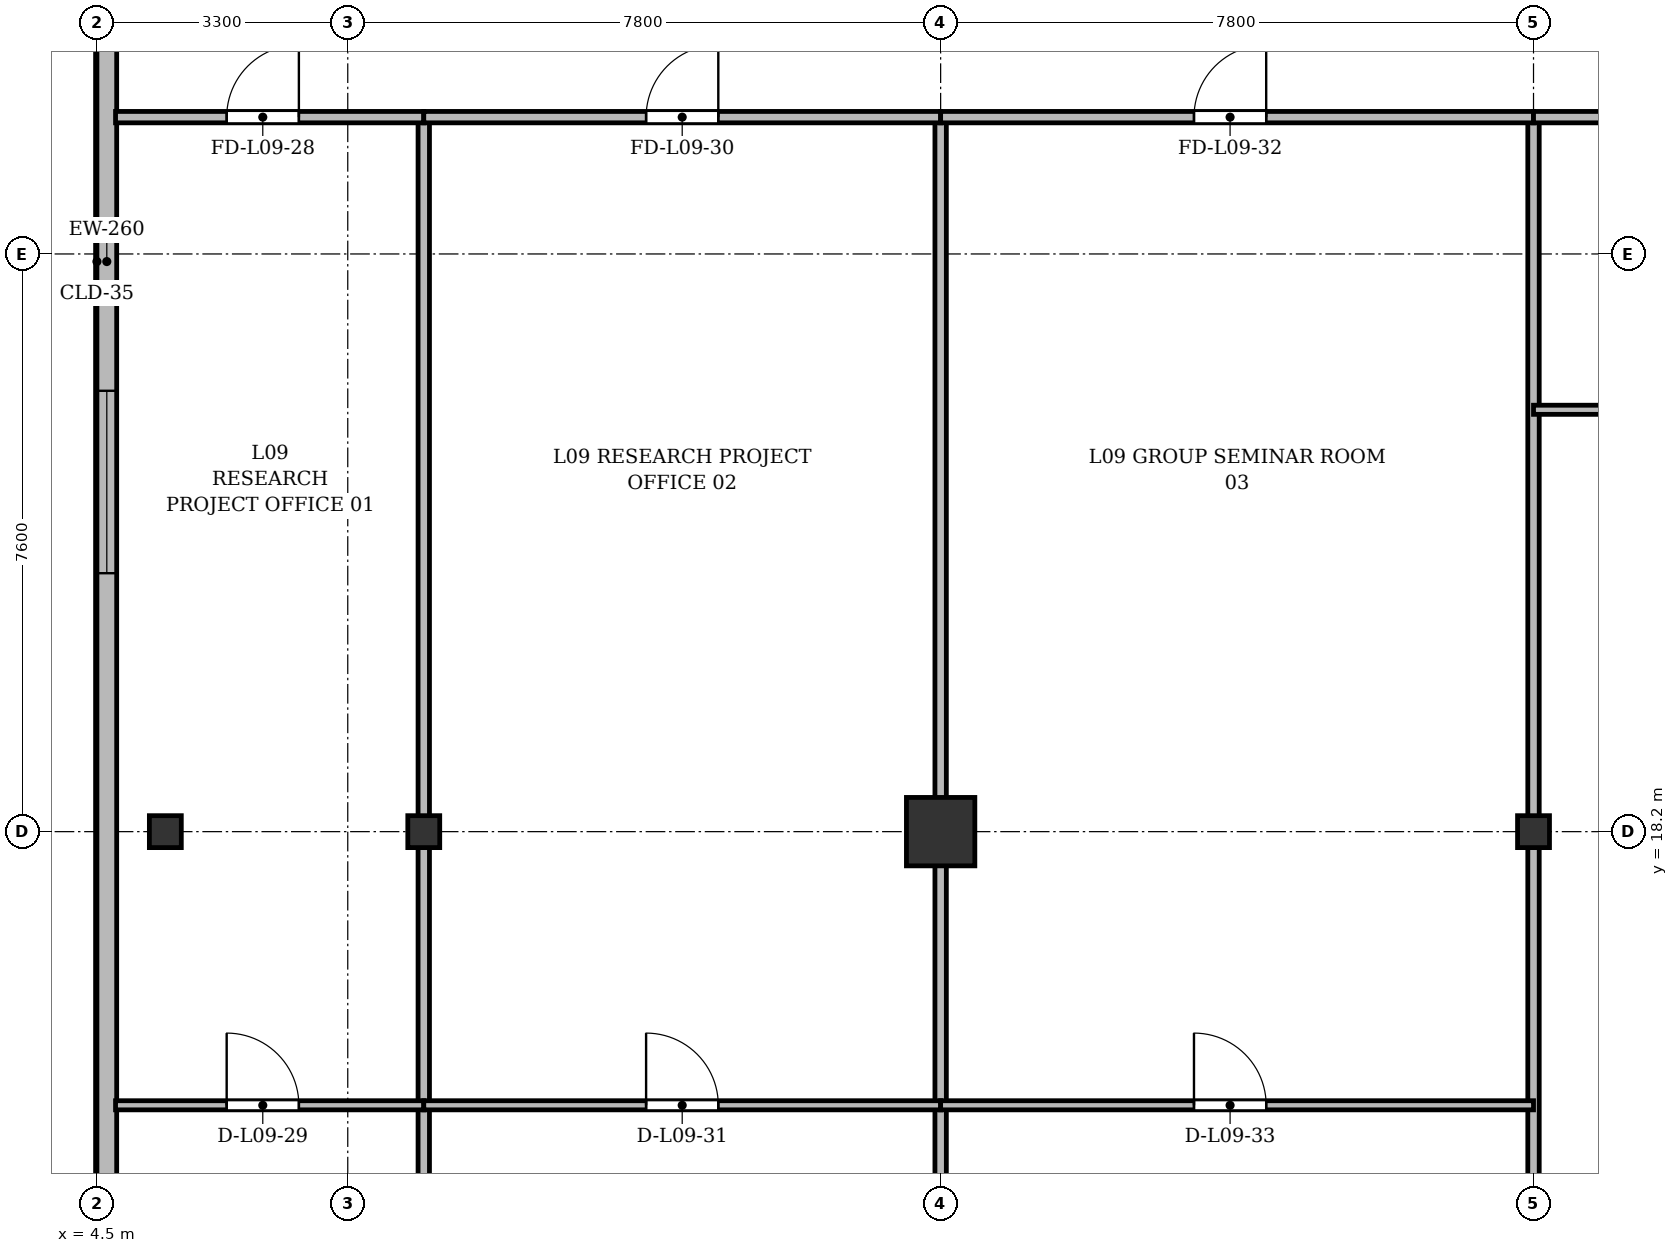
"""IFC4 building model, lengths in metres.
Left out: names, types, materials, properties, quantities, classifications, styles, units other than length and angle.
Written with IfcOpenShell. Run it as: python <this file> out.ifc"""

import sys

from ifc_helpers import new_model, si_unit, direction, frame, frame_2d, origin, origin_2d, place, context, subcontext, project, spatial, rectangle, i_section, extrude, source, transform, mapped, element, fill, save


model = new_model("IFC4")
c1 = context("Model", 3, precision=1e-05, world=origin(), true_north=direction((0.0, 1.0)))
c2 = subcontext(c1, "Body", "Model", "MODEL_VIEW")
j1 = project(units=[si_unit("LENGTHUNIT", "METRE"), si_unit("PLANEANGLEUNIT", "RADIAN")], contexts=[c1])
p1 = place(None, origin())
s1 = spatial("IfcSite", under=j1, at=p1, CompositionType="ELEMENT")
p2 = place(p1, origin())
s2 = spatial("IfcBuilding", under=s1, at=p2, CompositionType="ELEMENT")
p3 = place(p2, frame((0.0, 0.0, 37.9)))
s3 = spatial("IfcBuildingStorey", under=s2, at=p3, CompositionType="ELEMENT", Elevation=37.9)
m1 = source(origin(), c2, "Body", "SweptSolid", [
    extrude(i_section(OverallWidth=0.42, OverallDepth=0.42, WebThickness=0.026, FlangeThickness=0.04, at=origin_2d()), origin(), (0.0, 0.0, 1.0), 3.6),
])
for number, where, z_axis, x_axis in (
    (1, (5.4, 18.2, 0.0), (0.0, 0.0, 1.0), (1.0, 0.0, 0.0)),
    (2, (8.8, 18.2, 0.0), (0.0, 0.0, 1.0), (1.0, 0.0, 0.0)),
):
    element("IfcColumn", number, at=place(p3, frame(where, z_axis=z_axis, x_axis=x_axis)), inside=s3, PredefinedType="COLUMN", context=c2, shape_type="MappedRepresentation", body=[
        mapped(m1, transform((0.0, 0.0, 0.0), x_axis=(1.0, 0.0, 0.0), y_axis=(0.0, 1.0, 0.0), z_axis=(0.0, 0.0, 1.0), scale=1.0)),
    ])
m2 = source(origin(), c2, "Body", "SweptSolid", [
    extrude(rectangle(XDim=0.9, YDim=0.9, at=origin_2d()), origin(), (0.0, 0.0, 1.0), 3.6),
])
p4 = place(p3, frame((15.6, 18.2, 0.0), z_axis=(0.0, 0.0, 1.0), x_axis=(1.0, 0.0, 0.0)))
e3 = element("IfcColumn", 3, at=p4, inside=s3, PredefinedType="COLUMN", context=c2, shape_type="MappedRepresentation", body=[
    mapped(m2, transform((0.0, 0.0, 0.0), x_axis=(1.0, 0.0, 0.0), y_axis=(0.0, 1.0, 0.0), z_axis=(0.0, 0.0, 1.0), scale=1.0)),
])
p5 = place(p3, frame((23.4, 18.2, 0.0), z_axis=(0.0, 0.0, 1.0), x_axis=(1.0, 0.0, 0.0)))
e4 = element("IfcColumn", 4, at=p5, inside=s3, PredefinedType="COLUMN", context=c2, shape_type="MappedRepresentation", body=[
    mapped(m1, transform((0.0, 0.0, 0.0), x_axis=(1.0, 0.0, 0.0), y_axis=(0.0, 1.0, 0.0), z_axis=(0.0, 0.0, 1.0), scale=1.0)),
])
p6 = place(p3, frame((4.63, 5.9, 0.0), z_axis=(0.0, 0.0, 1.0), x_axis=(0.0, 1.0, 0.0)))
e5 = element("IfcWall", 5, at=p6, inside=s3, PredefinedType="SOLIDWALL", context=c2, shape_type="SweptSolid", body=[
    extrude(rectangle(XDim=39.6, YDim=0.26, at=frame_2d((19.8, 0.0))), origin(), (0.0, 0.0, 1.0), 3.34),
])
p7 = place(p6, frame((1.45, 0.0, 0.92)))
e6 = element("IfcOpeningElement", 6, at=p7, cuts=e5, PredefinedType="OPENING", context=c2, shape_type="SweptSolid", body=[
    extrude(rectangle(XDim=1.2, YDim=1.65, at=frame_2d((0.6, 0.825))), frame((0.0, 0.14, 0.0), z_axis=(0.0, -1.0, 0.0), x_axis=(1.0, 0.0, 0.0)), (0.0, 0.0, 1.0), 0.28),
])
p8 = place(p6, frame((4.3, 0.0, 0.92)))
e7 = element("IfcOpeningElement", 7, at=p8, cuts=e5, PredefinedType="OPENING", context=c2, shape_type="SweptSolid", body=[
    extrude(rectangle(XDim=2.4, YDim=2.1, at=frame_2d((1.2, 1.05))), frame((0.0, 0.14, 0.0), z_axis=(0.0, -1.0, 0.0), x_axis=(1.0, 0.0, 0.0)), (0.0, 0.0, 1.0), 0.28),
])
p9 = place(p6, frame((15.7, 0.0, 0.92)))
e8 = element("IfcOpeningElement", 8, at=p9, cuts=e5, PredefinedType="OPENING", context=c2, shape_type="SweptSolid", body=[
    extrude(rectangle(XDim=2.4, YDim=2.1, at=frame_2d((1.2, 1.05))), frame((0.0, 0.14, 0.0), z_axis=(0.0, -1.0, 0.0), x_axis=(1.0, 0.0, 0.0)), (0.0, 0.0, 1.0), 0.28),
])
p10 = place(p6, frame((29.7, 0.0, 0.92)))
e9 = element("IfcOpeningElement", 9, at=p10, cuts=e5, PredefinedType="OPENING", context=c2, shape_type="SweptSolid", body=[
    extrude(rectangle(XDim=2.4, YDim=2.1, at=frame_2d((1.2, 1.05))), frame((0.0, 0.14, 0.0), z_axis=(0.0, -1.0, 0.0), x_axis=(1.0, 0.0, 0.0)), (0.0, 0.0, 1.0), 0.28),
])
p11 = place(p6, frame((33.9, 0.0, 0.92)))
e10 = element("IfcOpeningElement", 10, at=p11, cuts=e5, PredefinedType="OPENING", context=c2, shape_type="SweptSolid", body=[
    extrude(rectangle(XDim=1.2, YDim=1.65, at=frame_2d((0.6, 0.825))), frame((0.0, 0.14, 0.0), z_axis=(0.0, -1.0, 0.0), x_axis=(1.0, 0.0, 0.0)), (0.0, 0.0, 1.0), 0.28),
])
p12 = place(p6, frame((37.25, 0.0, 0.92)))
e11 = element("IfcOpeningElement", 11, at=p12, cuts=e5, PredefinedType="OPENING", context=c2, shape_type="SweptSolid", body=[
    extrude(rectangle(XDim=1.2, YDim=1.65, at=frame_2d((0.6, 0.825))), frame((0.0, 0.14, 0.0), z_axis=(0.0, -1.0, 0.0), x_axis=(1.0, 0.0, 0.0)), (0.0, 0.0, 1.0), 0.28),
])
for number, where, z_axis, x_axis in (
    (12, (8.8, 3.145, 0.0), (0.0, 0.0, 1.0), (0.0, 1.0, 0.0)),
    (13, (15.6, 3.145, 0.0), (0.0, 0.0, 1.0), (0.0, 1.0, 0.0)),
    (14, (23.4, 3.145, 0.0), (0.0, 0.0, 1.0), (0.0, 1.0, 0.0)),
):
    element("IfcWall", number, at=place(p3, frame(where, z_axis=z_axis, x_axis=x_axis)), inside=s3, PredefinedType="PARTITIONING", context=c2, shape_type="SweptSolid", body=[
        extrude(rectangle(XDim=24.455, YDim=0.15, at=frame_2d((12.228, 0.0))), origin(), (0.0, 0.0, 1.0), 2.752),
    ])
p13 = place(p3, frame((4.745, 27.6, 0.0), z_axis=(0.0, 0.0, 1.0), x_axis=(1.0, 0.0, 0.0)))
e15 = element("IfcWall", 15, at=p13, inside=s3, PredefinedType="PARTITIONING", context=c2, shape_type="SweptSolid", body=[
    extrude(rectangle(XDim=4.055, YDim=0.15, at=frame_2d((2.027, 0.0))), origin(), (0.0, 0.0, 1.0), 2.752),
])
p14 = place(p13, frame((1.462, 0.0, 0.0)))
e16 = element("IfcOpeningElement", 16, at=p14, cuts=e15, PredefinedType="OPENING", context=c2, shape_type="SweptSolid", body=[
    extrude(rectangle(XDim=0.95, YDim=2.15, at=frame_2d((0.475, 1.075))), frame((0.0, 0.085, 0.0), z_axis=(0.0, -1.0, 0.0), x_axis=(1.0, 0.0, 0.0)), (0.0, 0.0, 1.0), 0.17),
])
p15 = place(p3, frame((4.745, 14.6, 0.0), z_axis=(0.0, 0.0, 1.0), x_axis=(1.0, 0.0, 0.0)))
e17 = element("IfcWall", 17, at=p15, inside=s3, PredefinedType="PARTITIONING", context=c2, shape_type="SweptSolid", body=[
    extrude(rectangle(XDim=4.055, YDim=0.12, at=frame_2d((2.027, 0.0))), origin(), (0.0, 0.0, 1.0), 2.752),
])
p16 = place(p15, frame((1.462, 0.0, 0.0)))
e18 = element("IfcOpeningElement", 18, at=p16, cuts=e17, PredefinedType="OPENING", context=c2, shape_type="SweptSolid", body=[
    extrude(rectangle(XDim=0.95, YDim=2.15, at=frame_2d((0.475, 1.075))), frame((0.0, 0.07, 0.0), z_axis=(0.0, -1.0, 0.0), x_axis=(1.0, 0.0, 0.0)), (0.0, 0.0, 1.0), 0.14),
])
p17 = place(p3, frame((8.8, 27.6, 0.0), z_axis=(0.0, 0.0, 1.0), x_axis=(1.0, 0.0, 0.0)))
e19 = element("IfcWall", 19, at=p17, inside=s3, PredefinedType="PARTITIONING", context=c2, shape_type="SweptSolid", body=[
    extrude(rectangle(XDim=6.8, YDim=0.15, at=frame_2d((3.4, 0.0))), origin(), (0.0, 0.0, 1.0), 2.752),
])
p18 = place(p17, frame((2.925, 0.0, 0.0)))
e20 = element("IfcOpeningElement", 20, at=p18, cuts=e19, PredefinedType="OPENING", context=c2, shape_type="SweptSolid", body=[
    extrude(rectangle(XDim=0.95, YDim=2.15, at=frame_2d((0.475, 1.075))), frame((0.0, 0.085, 0.0), z_axis=(0.0, -1.0, 0.0), x_axis=(1.0, 0.0, 0.0)), (0.0, 0.0, 1.0), 0.17),
])
p19 = place(p3, frame((8.8, 14.6, 0.0), z_axis=(0.0, 0.0, 1.0), x_axis=(1.0, 0.0, 0.0)))
e21 = element("IfcWall", 21, at=p19, inside=s3, PredefinedType="PARTITIONING", context=c2, shape_type="SweptSolid", body=[
    extrude(rectangle(XDim=6.8, YDim=0.12, at=frame_2d((3.4, 0.0))), origin(), (0.0, 0.0, 1.0), 2.752),
])
p20 = place(p19, frame((2.925, 0.0, 0.0)))
e22 = element("IfcOpeningElement", 22, at=p20, cuts=e21, PredefinedType="OPENING", context=c2, shape_type="SweptSolid", body=[
    extrude(rectangle(XDim=0.95, YDim=2.15, at=frame_2d((0.475, 1.075))), frame((0.0, 0.07, 0.0), z_axis=(0.0, -1.0, 0.0), x_axis=(1.0, 0.0, 0.0)), (0.0, 0.0, 1.0), 0.14),
])
p21 = place(p3, frame((15.6, 27.6, 0.0), z_axis=(0.0, 0.0, 1.0), x_axis=(1.0, 0.0, 0.0)))
e23 = element("IfcWall", 23, at=p21, inside=s3, PredefinedType="PARTITIONING", context=c2, shape_type="SweptSolid", body=[
    extrude(rectangle(XDim=7.8, YDim=0.15, at=frame_2d((3.9, 0.0))), origin(), (0.0, 0.0, 1.0), 2.752),
])
p22 = place(p21, frame((3.333, 0.0, 0.0)))
e24 = element("IfcOpeningElement", 24, at=p22, cuts=e23, PredefinedType="OPENING", context=c2, shape_type="SweptSolid", body=[
    extrude(rectangle(XDim=0.95, YDim=2.15, at=frame_2d((0.475, 1.075))), frame((0.0, 0.085, 0.0), z_axis=(0.0, -1.0, 0.0), x_axis=(1.0, 0.0, 0.0)), (0.0, 0.0, 1.0), 0.17),
])
p23 = place(p3, frame((15.6, 14.6, 0.0), z_axis=(0.0, 0.0, 1.0), x_axis=(1.0, 0.0, 0.0)))
e25 = element("IfcWall", 25, at=p23, inside=s3, PredefinedType="PARTITIONING", context=c2, shape_type="SweptSolid", body=[
    extrude(rectangle(XDim=7.8, YDim=0.12, at=frame_2d((3.9, 0.0))), origin(), (0.0, 0.0, 1.0), 2.752),
])
p24 = place(p23, frame((3.333, 0.0, 0.0)))
e26 = element("IfcOpeningElement", 26, at=p24, cuts=e25, PredefinedType="OPENING", context=c2, shape_type="SweptSolid", body=[
    extrude(rectangle(XDim=0.95, YDim=2.15, at=frame_2d((0.475, 1.075))), frame((0.0, 0.07, 0.0), z_axis=(0.0, -1.0, 0.0), x_axis=(1.0, 0.0, 0.0)), (0.0, 0.0, 1.0), 0.14),
])
p25 = place(p3, frame((23.4, 27.6, 0.0), z_axis=(0.0, 0.0, 1.0), x_axis=(1.0, 0.0, 0.0)))
e27 = element("IfcWall", 27, at=p25, inside=s3, PredefinedType="PARTITIONING", context=c2, shape_type="SweptSolid", body=[
    extrude(rectangle(XDim=7.2, YDim=0.15, at=frame_2d((3.6, 0.0))), origin(), (0.0, 0.0, 1.0), 2.752),
])
p26 = place(p25, frame((3.125, 0.0, 0.0)))
e28 = element("IfcOpeningElement", 28, at=p26, cuts=e27, PredefinedType="OPENING", context=c2, shape_type="SweptSolid", body=[
    extrude(rectangle(XDim=0.95, YDim=2.15, at=frame_2d((0.475, 1.075))), frame((0.0, 0.085, 0.0), z_axis=(0.0, -1.0, 0.0), x_axis=(1.0, 0.0, 0.0)), (0.0, 0.0, 1.0), 0.17),
])
p27 = place(p3, frame((23.4, 23.75, 0.0), z_axis=(0.0, 0.0, 1.0), x_axis=(1.0, 0.0, 0.0)))
e29 = element("IfcWall", 29, at=p27, inside=s3, PredefinedType="PARTITIONING", context=c2, shape_type="SweptSolid", body=[
    extrude(rectangle(XDim=7.2, YDim=0.12, at=frame_2d((3.6, 0.0))), origin(), (0.0, 0.0, 1.0), 2.752),
])
p28 = place(p27, frame((3.125, 0.0, 0.0)))
e30 = element("IfcOpeningElement", 30, at=p28, cuts=e29, PredefinedType="OPENING", context=c2, shape_type="SweptSolid", body=[
    extrude(rectangle(XDim=0.95, YDim=2.15, at=frame_2d((0.475, 1.075))), frame((0.0, 0.07, 0.0), z_axis=(0.0, -1.0, 0.0), x_axis=(1.0, 0.0, 0.0)), (0.0, 0.0, 1.0), 0.14),
])
m3 = source(origin(), c2, "Body", "SweptSolid", [
    extrude(rectangle(XDim=2.4, YDim=2.1, at=frame_2d((1.2, 1.05))), frame((0.0, 0.03, 0.0), z_axis=(0.0, -1.0, 0.0), x_axis=(1.0, 0.0, 0.0)), (0.0, 0.0, 1.0), 0.06),
])
p29 = place(p9, origin())
e31 = element("IfcWindow", 31, at=p29, inside=s3, PartitioningType="SINGLE_PANEL", PredefinedType="WINDOW", context=c2, shape_type="MappedRepresentation", body=[
    mapped(m3, transform((0.0, 0.0, 0.0), x_axis=(1.0, 0.0, 0.0), y_axis=(0.0, 1.0, 0.0), z_axis=(0.0, 0.0, 1.0), scale=1.0)),
])
fill(e8, e31)
m4 = source(origin(), c2, "Body", "SweptSolid", [
    extrude(rectangle(XDim=0.95, YDim=2.15, at=frame_2d((0.475, 1.075))), frame((0.0, 0.025, 0.0), z_axis=(0.0, -1.0, 0.0), x_axis=(1.0, 0.0, 0.0)), (0.0, 0.0, 1.0), 0.05),
])
p30 = place(p14, origin())
e32 = element("IfcDoor", 32, at=p30, inside=s3, OperationType="SINGLE_SWING_RIGHT", PredefinedType="DOOR", context=c2, shape_type="MappedRepresentation", body=[
    mapped(m4, transform((0.0, 0.0, 0.0), x_axis=(1.0, 0.0, 0.0), y_axis=(0.0, 1.0, 0.0), z_axis=(0.0, 0.0, 1.0), scale=1.0)),
])
fill(e16, e32)
p31 = place(p16, origin())
e33 = element("IfcDoor", 33, at=p31, inside=s3, OperationType="SINGLE_SWING_LEFT", PredefinedType="DOOR", context=c2, shape_type="MappedRepresentation", body=[
    mapped(m4, transform((0.0, 0.0, 0.0), x_axis=(1.0, 0.0, 0.0), y_axis=(0.0, 1.0, 0.0), z_axis=(0.0, 0.0, 1.0), scale=1.0)),
])
fill(e18, e33)
p32 = place(p18, origin())
e34 = element("IfcDoor", 34, at=p32, inside=s3, OperationType="SINGLE_SWING_RIGHT", PredefinedType="DOOR", context=c2, shape_type="MappedRepresentation", body=[
    mapped(m4, transform((0.0, 0.0, 0.0), x_axis=(1.0, 0.0, 0.0), y_axis=(0.0, 1.0, 0.0), z_axis=(0.0, 0.0, 1.0), scale=1.0)),
])
fill(e20, e34)
p33 = place(p20, origin())
e35 = element("IfcDoor", 35, at=p33, inside=s3, OperationType="SINGLE_SWING_LEFT", PredefinedType="DOOR", context=c2, shape_type="MappedRepresentation", body=[
    mapped(m4, transform((0.0, 0.0, 0.0), x_axis=(1.0, 0.0, 0.0), y_axis=(0.0, 1.0, 0.0), z_axis=(0.0, 0.0, 1.0), scale=1.0)),
])
fill(e22, e35)
p34 = place(p22, origin())
e36 = element("IfcDoor", 36, at=p34, inside=s3, OperationType="SINGLE_SWING_RIGHT", PredefinedType="DOOR", context=c2, shape_type="MappedRepresentation", body=[
    mapped(m4, transform((0.0, 0.0, 0.0), x_axis=(1.0, 0.0, 0.0), y_axis=(0.0, 1.0, 0.0), z_axis=(0.0, 0.0, 1.0), scale=1.0)),
])
fill(e24, e36)
p35 = place(p24, origin())
e37 = element("IfcDoor", 37, at=p35, inside=s3, OperationType="SINGLE_SWING_LEFT", PredefinedType="DOOR", context=c2, shape_type="MappedRepresentation", body=[
    mapped(m4, transform((0.0, 0.0, 0.0), x_axis=(1.0, 0.0, 0.0), y_axis=(0.0, 1.0, 0.0), z_axis=(0.0, 0.0, 1.0), scale=1.0)),
])
fill(e26, e37)
save(model, sys.argv[1])
